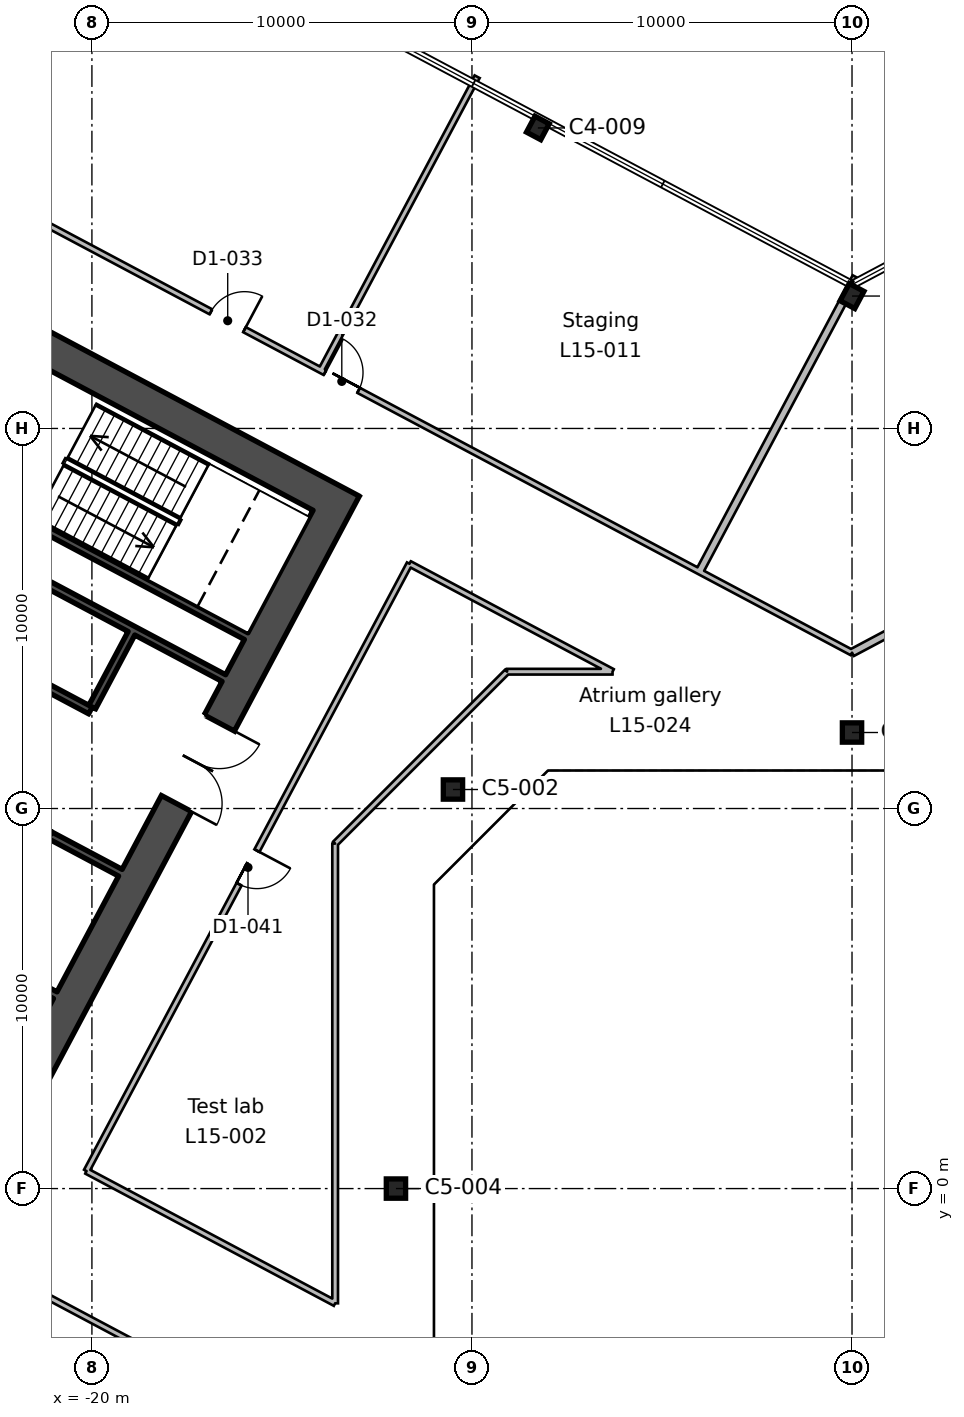
"""IFC4 building model, lengths in metres.
Left out: names, types, materials, properties, quantities, classifications, styles, units other than length and angle.
Written with IfcOpenShell. Run it as: python <this file> out.ifc"""

import sys

from ifc_helpers import new_model, si_unit, direction, frame, frame_2d, origin, origin_2d, place, context, subcontext, project, spatial, rectangle, hollow_rectangle, i_section, extrude, element, fill, save


model = new_model("IFC4")
c1 = context("Model", 3, precision=1e-05, world=origin(), true_north=direction((0.0, 1.0)))
c2 = subcontext(c1, "Body", "Model", "MODEL_VIEW")
j1 = project(units=[si_unit("LENGTHUNIT", "METRE"), si_unit("PLANEANGLEUNIT", "RADIAN")], contexts=[c1])
p1 = place(None, origin())
s1 = spatial("IfcSite", under=j1, at=p1, CompositionType="ELEMENT")
p2 = place(p1, origin())
s2 = spatial("IfcBuilding", under=s1, at=p2, CompositionType="ELEMENT")
p3 = place(p2, frame((0.0, 0.0, 80.0)))
s3 = spatial("IfcBuildingStorey", under=s2, at=p3, CompositionType="ELEMENT", Elevation=80.0)
for number, where, z_axis, x_axis in (
    (1, (-12.0, 0.0, 0.0), (0.0, 0.0, 1.0), (1.0, 0.0, 0.0)),
    (2, (-10.5, 10.5, 0.0), (0.0, 0.0, 1.0), (1.0, 0.0, 0.0)),
    (3, (0.0, 12.0, 0.0), (0.0, 0.0, 1.0), (1.0, 0.0, 0.0)),
):
    element("IfcColumn", number, at=place(p3, frame(where, z_axis=z_axis, x_axis=x_axis)), inside=s3, PredefinedType="COLUMN", context=c2, shape_type="SweptSolid", body=[
        extrude(hollow_rectangle(XDim=0.508, YDim=0.508, WallThickness=0.021, InnerFilletRadius=0.01, OuterFilletRadius=0.031, at=origin_2d()), origin(), (0.0, 0.0, 1.0), 4.6),
    ])
p4 = place(p3, frame((0.0, 23.484, 0.0), z_axis=(0.0, 0.0, 1.0), x_axis=(-0.882947592859, 0.469471562786, 0.0)))
e4 = element("IfcColumn", 4, at=p4, inside=s3, PredefinedType="COLUMN", context=c2, shape_type="SweptSolid", body=[
    extrude(i_section(OverallWidth=0.437, OverallDepth=0.513, WebThickness=0.061, FlangeThickness=0.097, FilletRadius=0.015, at=origin_2d()), origin(), (0.0, 0.0, 1.0), 4.6),
])
p5 = place(p3, frame((-8.266, 27.907, 0.0), z_axis=(0.0, 0.0, 1.0), x_axis=(-0.882947592859, 0.469471562786, 0.0)))
e5 = element("IfcColumn", 5, at=p5, inside=s3, PredefinedType="COLUMN", context=c2, shape_type="SweptSolid", body=[
    extrude(i_section(OverallWidth=0.424, OverallDepth=0.475, WebThickness=0.048, FlangeThickness=0.077, FilletRadius=0.015, at=origin_2d()), origin(), (0.0, 0.0, 1.0), 4.6),
])
p6 = place(p3, frame((-13.362, 18.43, 0.0), z_axis=(0.0, 0.0, 1.0), x_axis=(-0.46947084998, -0.882947971864, 0.0)))
e6 = element("IfcWall", 6, at=p6, inside=s3, PredefinedType="SHEAR", context=c2, shape_type="SweptSolid", body=[
    extrude(rectangle(XDim=20.0, YDim=0.9, at=frame_2d((10.0, 0.0))), origin(), (0.0, 0.0, 1.0), 4.6),
])
p7 = place(p6, frame((7.0, 0.0, 0.0)))
e7 = element("IfcOpeningElement", 7, at=p7, cuts=e6, PredefinedType="OPENING", context=c2, shape_type="SweptSolid", body=[
    extrude(rectangle(XDim=2.4, YDim=2.4, at=frame_2d((1.2, 1.2))), frame((0.0, 0.46, 0.0), z_axis=(0.0, -1.0, 0.0), x_axis=(1.0, 0.0, 0.0)), (0.0, 0.0, 1.0), 0.92),
])
p8 = place(p3, frame((-13.97, 18.244, 0.0), z_axis=(0.0, 0.0, 1.0), x_axis=(-0.88294509198, 0.469476266226, 0.0)))
e8 = element("IfcWall", 8, at=p8, inside=s3, PredefinedType="SHEAR", context=c2, shape_type="SweptSolid", body=[
    extrude(rectangle(XDim=20.2, YDim=0.9, at=frame_2d((10.1, 0.0))), origin(), (0.0, 0.0, 1.0), 4.6),
])
p9 = place(p3, frame((-18.96, 14.611, 0.0), z_axis=(0.0, 0.0, 1.0), x_axis=(-0.4694473164, -0.882960484464, 0.0)))
e9 = element("IfcWall", 9, at=p9, inside=s3, PredefinedType="SHEAR", context=c2, shape_type="SweptSolid", body=[
    extrude(rectangle(XDim=2.2, YDim=0.2, at=frame_2d((1.1, 0.0))), origin(), (0.0, 0.0, 1.0), 4.6),
])
p10 = place(p3, frame((-15.942, 14.536, 0.0), z_axis=(0.0, 0.0, 1.0), x_axis=(-0.882946947542, 0.469472776449, 0.0)))
e10 = element("IfcWall", 10, at=p10, inside=s3, PredefinedType="SHEAR", context=c2, shape_type="SweptSolid", body=[
    extrude(rectangle(XDim=8.0, YDim=0.2, at=frame_2d((4.0, 0.0))), origin(), (0.0, 0.0, 1.0), 4.6),
])
p11 = place(p3, frame((-16.529, 13.432, 0.0), z_axis=(0.0, 0.0, 1.0), x_axis=(-0.88295287151, 0.469461634952, 0.0)))
e11 = element("IfcWall", 11, at=p11, inside=s3, PredefinedType="SHEAR", context=c2, shape_type="SweptSolid", body=[
    extrude(rectangle(XDim=8.0, YDim=0.2, at=frame_2d((4.0, 0.0))), origin(), (0.0, 0.0, 1.0), 4.6),
])
p12 = place(p3, frame((-20.04, 12.581, 0.0), z_axis=(0.0, 0.0, 1.0), x_axis=(-0.882942972946, 0.469480251476, 0.0)))
e12 = element("IfcWall", 12, at=p12, inside=s3, PredefinedType="SHEAR", context=c2, shape_type="SweptSolid", body=[
    extrude(rectangle(XDim=5.4, YDim=0.2, at=frame_2d((2.7, 0.0))), origin(), (0.0, 0.0, 1.0), 4.6),
])
p13 = place(p12, frame((2.25, 0.0, 0.0)))
e13 = element("IfcOpeningElement", 13, at=p13, cuts=e12, PredefinedType="OPENING", context=c2, shape_type="SweptSolid", body=[
    extrude(rectangle(XDim=0.9, YDim=2.1, at=frame_2d((0.45, 1.05))), frame((0.0, 0.11, 0.0), z_axis=(0.0, -1.0, 0.0), x_axis=(1.0, 0.0, 0.0)), (0.0, 0.0, 1.0), 0.22),
])
p14 = place(p3, frame((-19.252, 8.311, 0.0), z_axis=(0.0, 0.0, 1.0), x_axis=(-0.882955722218, 0.469456273365, 0.0)))
e14 = element("IfcWall", 14, at=p14, inside=s3, PredefinedType="SHEAR", context=c2, shape_type="SweptSolid", body=[
    extrude(rectangle(XDim=10.0, YDim=0.2, at=frame_2d((5.0, 0.0))), origin(), (0.0, 0.0, 1.0), 4.6),
])
p15 = place(p14, frame((2.1, 0.0, 0.0)))
e15 = element("IfcOpeningElement", 15, at=p15, cuts=e14, PredefinedType="OPENING", context=c2, shape_type="SweptSolid", body=[
    extrude(rectangle(XDim=1.2, YDim=2.1, at=frame_2d((0.6, 1.05))), frame((0.0, 0.11, 0.0), z_axis=(0.0, -1.0, 0.0), x_axis=(1.0, 0.0, 0.0)), (0.0, 0.0, 1.0), 0.22),
])
p16 = place(p3, frame((-20.965, 5.088, 0.0), z_axis=(0.0, 0.0, 1.0), x_axis=(-0.882925986334, 0.469512196493, 0.0)))
e16 = element("IfcWall", 16, at=p16, inside=s3, PredefinedType="SHEAR", context=c2, shape_type="SweptSolid", body=[
    extrude(rectangle(XDim=4.5, YDim=0.2, at=frame_2d((2.25, 0.0))), origin(), (0.0, 0.0, 1.0), 4.6),
])
p17 = place(p16, frame((0.6, 0.0, 0.0)))
e17 = element("IfcOpeningElement", 17, at=p17, cuts=e16, PredefinedType="OPENING", context=c2, shape_type="SweptSolid", body=[
    extrude(rectangle(XDim=1.1, YDim=2.1, at=frame_2d((0.55, 1.05))), frame((0.0, 0.11, 0.0), z_axis=(0.0, -1.0, 0.0), x_axis=(1.0, 0.0, 0.0)), (0.0, 0.0, 1.0), 0.22),
])
p18 = place(p3, frame((-13.6, -6.869, 0.0), z_axis=(0.0, 0.0, 1.0), x_axis=(-0.88295406426, 0.469459391648, 0.0)))
e18 = element("IfcWall", 18, at=p18, inside=s3, PredefinedType="PARTITIONING", context=c2, shape_type="SweptSolid", body=[
    extrude(rectangle(XDim=35.091, YDim=0.15, at=frame_2d((17.545, 0.0))), origin(), (0.0, 0.0, 1.0), 4.2),
])
p19 = place(p18, frame((20.45, 0.0, 0.0)))
e19 = element("IfcOpeningElement", 19, at=p19, cuts=e18, PredefinedType="OPENING", context=c2, shape_type="SweptSolid", body=[
    extrude(rectangle(XDim=1.0, YDim=2.1, at=frame_2d((0.5, 1.05))), frame((0.0, 0.085, 0.0), z_axis=(0.0, -1.0, 0.0), x_axis=(1.0, 0.0, 0.0)), (0.0, 0.0, 1.0), 0.17),
])
p20 = place(p18, frame((17.05, 0.0, 0.0)))
e20 = element("IfcOpeningElement", 20, at=p20, cuts=e18, PredefinedType="OPENING", context=c2, shape_type="SweptSolid", body=[
    extrude(rectangle(XDim=1.0, YDim=2.1, at=frame_2d((0.5, 1.05))), frame((0.0, 0.085, 0.0), z_axis=(0.0, -1.0, 0.0), x_axis=(1.0, 0.0, 0.0)), (0.0, 0.0, 1.0), 0.17),
])
p21 = place(p3, frame((-32.894, 31.59, 0.0), z_axis=(0.0, 0.0, 1.0), x_axis=(0.882948512555, -0.469469833085, 0.0)))
e21 = element("IfcWall", 21, at=p21, inside=s3, PredefinedType="PARTITIONING", context=c2, shape_type="SweptSolid", body=[
    extrude(rectangle(XDim=37.255, YDim=0.15, at=frame_2d((18.627, 0.0))), origin(), (0.0, 0.0, 1.0), 4.2),
])
p22 = place(p21, frame((21.55, 0.0, 0.0)))
e22 = element("IfcOpeningElement", 22, at=p22, cuts=e21, PredefinedType="OPENING", context=c2, shape_type="SweptSolid", body=[
    extrude(rectangle(XDim=1.0, YDim=2.1, at=frame_2d((0.5, 1.05))), frame((0.0, 0.085, 0.0), z_axis=(0.0, -1.0, 0.0), x_axis=(1.0, 0.0, 0.0)), (0.0, 0.0, 1.0), 0.17),
])
p23 = place(p21, frame((18.15, 0.0, 0.0)))
e23 = element("IfcOpeningElement", 23, at=p23, cuts=e21, PredefinedType="OPENING", context=c2, shape_type="SweptSolid", body=[
    extrude(rectangle(XDim=1.0, YDim=2.1, at=frame_2d((0.5, 1.05))), frame((0.0, 0.085, 0.0), z_axis=(0.0, -1.0, 0.0), x_axis=(1.0, 0.0, 0.0)), (0.0, 0.0, 1.0), 0.17),
])
p24 = place(p3, frame((0.0, 14.1, 0.0), z_axis=(0.0, 0.0, 1.0), x_axis=(0.882942713919, 0.469480738623, 0.0)))
e24 = element("IfcWall", 24, at=p24, inside=s3, PredefinedType="PARTITIONING", context=c2, shape_type="SweptSolid", body=[
    extrude(rectangle(XDim=36.591, YDim=0.2, at=frame_2d((18.296, 0.0))), origin(), (0.0, 0.0, 1.0), 4.2),
])
p25 = place(p24, frame((20.45, 0.0, 0.0)))
e25 = element("IfcOpeningElement", 25, at=p25, cuts=e24, PredefinedType="OPENING", context=c2, shape_type="SweptSolid", body=[
    extrude(rectangle(XDim=1.0, YDim=2.1, at=frame_2d((0.5, 1.05))), frame((0.0, 0.11, 0.0), z_axis=(0.0, -1.0, 0.0), x_axis=(1.0, 0.0, 0.0)), (0.0, 0.0, 1.0), 0.22),
])
p26 = place(p24, frame((17.75, 0.0, 0.0)))
e26 = element("IfcOpeningElement", 26, at=p26, cuts=e24, PredefinedType="OPENING", context=c2, shape_type="SweptSolid", body=[
    extrude(rectangle(XDim=1.0, YDim=2.1, at=frame_2d((0.5, 1.05))), frame((0.0, 0.11, 0.0), z_axis=(0.0, -1.0, 0.0), x_axis=(1.0, 0.0, 0.0)), (0.0, 0.0, 1.0), 0.22),
])
p27 = place(p3, frame((-9.864, 29.255, 0.0), z_axis=(0.0, 0.0, 1.0), x_axis=(-0.469472759909, -0.882946956336, 0.0)))
e27 = element("IfcWall", 27, at=p27, inside=s3, PredefinedType="PARTITIONING", context=c2, shape_type="SweptSolid", body=[
    extrude(rectangle(XDim=8.75, YDim=0.15, at=frame_2d((4.375, 0.0))), origin(), (0.0, 0.0, 1.0), 4.2),
])
p28 = place(p3, frame((-20.142, 0.46, 0.0), z_axis=(0.0, 0.0, 1.0), x_axis=(0.469506937019, 0.882928783136, 0.0)))
e28 = element("IfcWall", 28, at=p28, inside=s3, PredefinedType="PARTITIONING", context=c2, shape_type="SweptSolid", body=[
    extrude(rectangle(XDim=18.1, YDim=0.15, at=frame_2d((9.05, 0.0))), origin(), (0.0, 0.0, 1.0), 4.2),
])
p29 = place(p28, frame((8.55, 0.0, 0.0)))
e29 = element("IfcOpeningElement", 29, at=p29, cuts=e28, PredefinedType="OPENING", context=c2, shape_type="SweptSolid", body=[
    extrude(rectangle(XDim=1.0, YDim=2.1, at=frame_2d((0.5, 1.05))), frame((0.0, 0.085, 0.0), z_axis=(0.0, -1.0, 0.0), x_axis=(1.0, 0.0, 0.0)), (0.0, 0.0, 1.0), 0.17),
])
p30 = place(p3, frame((-11.644, 16.441, 0.0), z_axis=(0.0, 0.0, 1.0), x_axis=(0.882853947977, -0.469647640834, 0.0)))
e30 = element("IfcWall", 30, at=p30, inside=s3, PredefinedType="PARTITIONING", context=c2, shape_type="SweptSolid", body=[
    extrude(rectangle(XDim=3.153, YDim=0.15, at=frame_2d((1.577, 0.0))), origin(), (0.0, 0.0, 1.0), 4.2),
])
p31 = place(p3, frame((-13.6, -3.019, 0.0), z_axis=(0.0, 0.0, 1.0), x_axis=(-0.882915984826, 0.469531004022, 0.0)))
e31 = element("IfcWall", 31, at=p31, inside=s3, PredefinedType="PARTITIONING", context=c2, shape_type="SweptSolid", body=[
    extrude(rectangle(XDim=7.409, YDim=0.15, at=frame_2d((3.705, 0.0))), origin(), (0.0, 0.0, 1.0), 4.2),
])
p32 = place(p3, frame((-13.6, 9.077, 0.0), z_axis=(0.0, 0.0, 1.0), x_axis=(0.0, -1.0, 0.0)))
e32 = element("IfcWall", 32, at=p32, inside=s3, PredefinedType="PARTITIONING", context=c2, shape_type="SweptSolid", body=[
    extrude(rectangle(XDim=12.096, YDim=0.15, at=frame_2d((6.048, 0.0))), origin(), (0.0, 0.0, 1.0), 4.2),
])
p33 = place(p3, frame((-13.6, 9.077, 0.0), z_axis=(0.0, 0.0, 1.0), x_axis=(0.707106781187, 0.707106781187, 0.0)))
e33 = element("IfcWall", 33, at=p33, inside=s3, PredefinedType="PARTITIONING", context=c2, shape_type="SweptSolid", body=[
    extrude(rectangle(XDim=6.397, YDim=0.15, at=frame_2d((3.198, 0.0))), origin(), (0.0, 0.0, 1.0), 4.2),
])
p34 = place(p3, frame((0.105, 23.984, 0.0), z_axis=(0.0, 0.0, 1.0), x_axis=(-0.469364726907, -0.883004390213, 0.0)))
e34 = element("IfcWall", 34, at=p34, inside=s3, PredefinedType="PARTITIONING", context=c2, shape_type="SweptSolid", body=[
    extrude(rectangle(XDim=8.775, YDim=0.2, at=frame_2d((4.388, 0.0))), origin(), (0.0, 0.0, 1.0), 4.2),
])
p35 = place(p3, frame((-6.301, 13.6, 0.0), z_axis=(0.0, 0.0, 1.0), x_axis=(-1.0, 0.0, 0.0)))
e35 = element("IfcWall", 35, at=p35, inside=s3, PredefinedType="PARTITIONING", context=c2, shape_type="SweptSolid", body=[
    extrude(rectangle(XDim=2.776, YDim=0.15, at=frame_2d((1.388, 0.0))), origin(), (0.0, 0.0, 1.0), 4.2),
])
p36 = place(p3, frame((-6.301, 13.6, 0.0), z_axis=(0.0, 0.0, 1.0), x_axis=(-0.883065539011, 0.469249671083, 0.0)))
e36 = element("IfcWall", 36, at=p36, inside=s3, PredefinedType="PARTITIONING", context=c2, shape_type="SweptSolid", body=[
    extrude(rectangle(XDim=2.898, YDim=0.15, at=frame_2d((1.449, 0.0))), origin(), (0.0, 0.0, 1.0), 4.2),
])
p37 = place(p7, origin())
e37 = element("IfcDoor", 37, at=p37, inside=s3, OperationType="DOUBLE_DOOR_SINGLE_SWING", PredefinedType="DOOR", context=c2, shape_type="SweptSolid", body=[
    extrude(rectangle(XDim=2.4, YDim=2.4, at=frame_2d((1.2, 1.2))), frame((0.0, 0.025, 0.0), z_axis=(0.0, -1.0, 0.0), x_axis=(1.0, 0.0, 0.0)), (0.0, 0.0, 1.0), 0.05),
])
fill(e7, e37)
p38 = place(p29, frame((1.0, 0.0, 0.0), z_axis=(0.0, 0.0, 1.0), x_axis=(-1.0, 0.0, 0.0)))
e38 = element("IfcDoor", 38, at=p38, inside=s3, OperationType="SINGLE_SWING_LEFT", PredefinedType="DOOR", context=c2, shape_type="SweptSolid", body=[
    extrude(rectangle(XDim=1.0, YDim=2.1, at=frame_2d((0.5, 1.05))), frame((0.0, 0.025, 0.0), z_axis=(0.0, -1.0, 0.0), x_axis=(1.0, 0.0, 0.0)), (0.0, 0.0, 1.0), 0.05),
])
fill(e29, e38)
p39 = place(p22, origin())
e39 = element("IfcDoor", 39, at=p39, inside=s3, OperationType="SINGLE_SWING_LEFT", PredefinedType="DOOR", context=c2, shape_type="SweptSolid", body=[
    extrude(rectangle(XDim=1.0, YDim=2.1, at=frame_2d((0.5, 1.05))), frame((0.0, 0.025, 0.0), z_axis=(0.0, -1.0, 0.0), x_axis=(1.0, 0.0, 0.0)), (0.0, 0.0, 1.0), 0.05),
])
fill(e22, e39)
p40 = place(p23, origin())
e40 = element("IfcDoor", 40, at=p40, inside=s3, OperationType="SINGLE_SWING_RIGHT", PredefinedType="DOOR", context=c2, shape_type="SweptSolid", body=[
    extrude(rectangle(XDim=1.0, YDim=2.1, at=frame_2d((0.5, 1.05))), frame((0.0, 0.025, 0.0), z_axis=(0.0, -1.0, 0.0), x_axis=(1.0, 0.0, 0.0)), (0.0, 0.0, 1.0), 0.05),
])
fill(e23, e40)
save(model, sys.argv[1])
